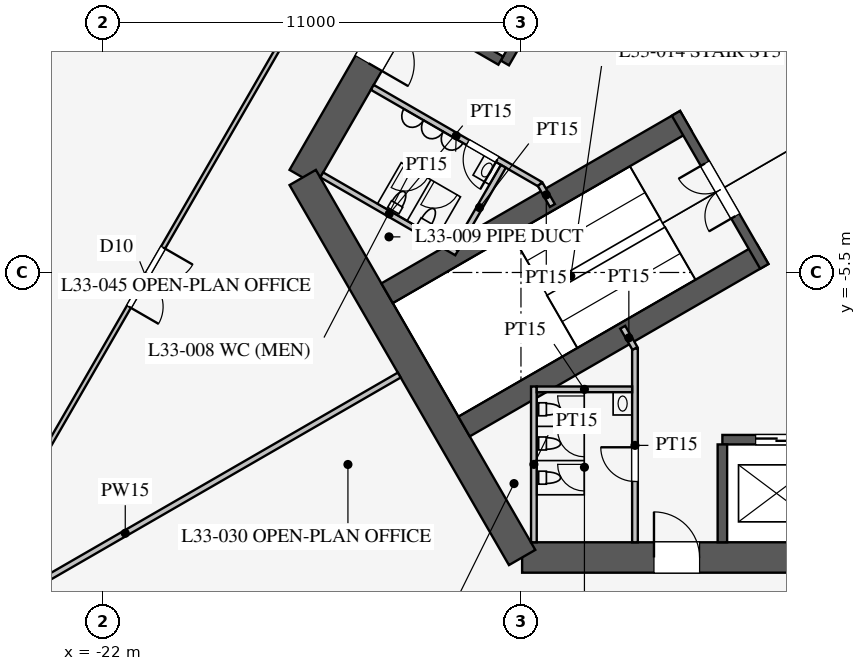
"""IFC4 building model, lengths in metres.
Left out: names, types, materials, properties, quantities, classifications, styles, units other than length and angle.
Written with IfcOpenShell. Run it as: python <this file> out.ifc"""

import sys

from ifc_helpers import new_model, si_unit, direction, frame, frame_2d, origin, place, context, subcontext, project, spatial, rectangle, extrude, element, fill, save


model = new_model("IFC4")
c1 = context("Model", 3, precision=1e-05, world=origin(), true_north=direction((0.0, 1.0)))
c2 = subcontext(c1, "Body", "Model", "MODEL_VIEW")
j1 = project(units=[si_unit("LENGTHUNIT", "METRE"), si_unit("PLANEANGLEUNIT", "RADIAN")], contexts=[c1])
p1 = place(None, origin())
s1 = spatial("IfcSite", under=j1, at=p1, CompositionType="ELEMENT")
p2 = place(p1, origin())
s2 = spatial("IfcBuilding", under=s1, at=p2, CompositionType="ELEMENT")
p3 = place(p2, frame((0.0, 0.0, 145.1)))
s3 = spatial("IfcBuildingStorey", under=s2, at=p3, CompositionType="ELEMENT", Elevation=145.1)
p4 = place(p3, frame((-10.97, -13.0, 0.0), z_axis=(0.0, 0.0, 1.0), x_axis=(1.0, 0.0, 0.0)))
e1 = element("IfcWall", 1, at=p4, inside=s3, PredefinedType="SHEAR", context=c2, shape_type="SweptSolid", body=[
    extrude(rectangle(XDim=21.939, YDim=0.8, at=frame_2d((10.97, 0.0))), origin(), (0.0, 0.0, 1.0), 4.2),
])
p5 = place(p4, frame((17.27, 0.0, 0.0)))
e2 = element("IfcOpeningElement", 2, at=p5, cuts=e1, PredefinedType="OPENING", context=c2, shape_type="SweptSolid", body=[
    extrude(rectangle(XDim=1.2, YDim=2.1, at=frame_2d((0.6, 1.05))), frame((0.0, 0.41, 0.0), z_axis=(0.0, -1.0, 0.0), x_axis=(1.0, 0.0, 0.0)), (0.0, 0.0, 1.0), 0.82),
])
p6 = place(p4, frame((3.47, 0.0, 0.0)))
e3 = element("IfcOpeningElement", 3, at=p6, cuts=e1, PredefinedType="OPENING", context=c2, shape_type="SweptSolid", body=[
    extrude(rectangle(XDim=1.2, YDim=2.1, at=frame_2d((0.6, 1.05))), frame((0.0, 0.41, 0.0), z_axis=(0.0, -1.0, 0.0), x_axis=(1.0, 0.0, 0.0)), (0.0, 0.0, 1.0), 0.82),
])
p7 = place(p3, frame((-5.773, 16.0, 0.0), z_axis=(0.0, 0.0, 1.0), x_axis=(-0.500002442456, -0.866023993627, 0.0)))
e4 = element("IfcWall", 4, at=p7, inside=s3, PredefinedType="SHEAR", context=c2, shape_type="SweptSolid", body=[
    extrude(rectangle(XDim=21.939, YDim=0.8, at=frame_2d((10.97, 0.0))), origin(), (0.0, 0.0, 1.0), 4.2),
])
p8 = place(p7, frame((17.27, 0.0, 0.0)))
e5 = element("IfcOpeningElement", 5, at=p8, cuts=e4, PredefinedType="OPENING", context=c2, shape_type="SweptSolid", body=[
    extrude(rectangle(XDim=1.2, YDim=2.1, at=frame_2d((0.6, 1.05))), frame((0.0, 0.41, 0.0), z_axis=(0.0, -1.0, 0.0), x_axis=(1.0, 0.0, 0.0)), (0.0, 0.0, 1.0), 0.82),
])
p9 = place(p7, frame((3.47, 0.0, 0.0)))
e6 = element("IfcOpeningElement", 6, at=p9, cuts=e4, PredefinedType="OPENING", context=c2, shape_type="SweptSolid", body=[
    extrude(rectangle(XDim=1.2, YDim=2.1, at=frame_2d((0.6, 1.05))), frame((0.0, 0.41, 0.0), z_axis=(0.0, -1.0, 0.0), x_axis=(1.0, 0.0, 0.0)), (0.0, 0.0, 1.0), 0.82),
])
p10 = place(p3, frame((-16.743, -3.0, 0.0), z_axis=(0.0, 0.0, 1.0), x_axis=(0.499995765644, -0.866027848477, 0.0)))
e7 = element("IfcWall", 7, at=p10, inside=s3, PredefinedType="SHEAR", context=c2, shape_type="SweptSolid", body=[
    extrude(rectangle(XDim=11.547, YDim=0.8, at=frame_2d((5.773, 0.0))), origin(), (0.0, 0.0, 1.0), 4.2),
])
p11 = place(p3, frame((-5.7, -9.9, 0.0), z_axis=(0.0, 0.0, 1.0), x_axis=(1.0, 0.0, 0.0)))
e8 = element("IfcWall", 8, at=p11, inside=s3, PredefinedType="SHEAR", context=c2, shape_type="SweptSolid", body=[
    extrude(rectangle(XDim=11.4, YDim=0.25, at=frame_2d((5.7, 0.0))), origin(), (0.0, 0.0, 1.0), 4.2),
])
p12 = place(p11, frame((0.875, 0.0, 0.0)))
e9 = element("IfcOpeningElement", 9, at=p12, cuts=e8, PredefinedType="OPENING", context=c2, shape_type="SweptSolid", body=[
    extrude(rectangle(XDim=1.1, YDim=2.2, at=frame_2d((0.55, 1.1))), frame((0.0, 0.135, 0.0), z_axis=(0.0, -1.0, 0.0), x_axis=(1.0, 0.0, 0.0)), (0.0, 0.0, 1.0), 0.27),
])
p13 = place(p11, frame((3.725, 0.0, 0.0)))
e10 = element("IfcOpeningElement", 10, at=p13, cuts=e8, PredefinedType="OPENING", context=c2, shape_type="SweptSolid", body=[
    extrude(rectangle(XDim=1.1, YDim=2.2, at=frame_2d((0.55, 1.1))), frame((0.0, 0.135, 0.0), z_axis=(0.0, -1.0, 0.0), x_axis=(1.0, 0.0, 0.0)), (0.0, 0.0, 1.0), 0.27),
])
p14 = place(p11, frame((6.575, 0.0, 0.0)))
e11 = element("IfcOpeningElement", 11, at=p14, cuts=e8, PredefinedType="OPENING", context=c2, shape_type="SweptSolid", body=[
    extrude(rectangle(XDim=1.1, YDim=2.2, at=frame_2d((0.55, 1.1))), frame((0.0, 0.135, 0.0), z_axis=(0.0, -1.0, 0.0), x_axis=(1.0, 0.0, 0.0)), (0.0, 0.0, 1.0), 0.27),
])
p15 = place(p11, frame((9.425, 0.0, 0.0)))
e12 = element("IfcOpeningElement", 12, at=p15, cuts=e8, PredefinedType="OPENING", context=c2, shape_type="SweptSolid", body=[
    extrude(rectangle(XDim=1.1, YDim=2.2, at=frame_2d((0.55, 1.1))), frame((0.0, 0.135, 0.0), z_axis=(0.0, -1.0, 0.0), x_axis=(1.0, 0.0, 0.0)), (0.0, 0.0, 1.0), 0.27),
])
p16 = place(p3, frame((-5.7, -10.025, 0.0), z_axis=(0.0, 0.0, 1.0), x_axis=(0.0, -1.0, 0.0)))
e13 = element("IfcWall", 13, at=p16, inside=s3, PredefinedType="SHEAR", context=c2, shape_type="SweptSolid", body=[
    extrude(rectangle(XDim=2.575, YDim=0.25, at=frame_2d((1.288, 0.0))), origin(), (0.0, 0.0, 1.0), 4.2),
])
p17 = place(p3, frame((-5.724, 9.886, 0.0), z_axis=(0.0, 0.0, 1.0), x_axis=(-0.500001763848, -0.866024385424, 0.0)))
e14 = element("IfcWall", 14, at=p17, inside=s3, PredefinedType="SHEAR", context=c2, shape_type="SweptSolid", body=[
    extrude(rectangle(XDim=11.4, YDim=0.25, at=frame_2d((5.7, 0.0))), origin(), (0.0, 0.0, 1.0), 4.2),
])
p18 = place(p17, frame((6.525, 0.0, 0.0)))
e15 = element("IfcOpeningElement", 15, at=p18, cuts=e14, PredefinedType="OPENING", context=c2, shape_type="SweptSolid", body=[
    extrude(rectangle(XDim=1.2, YDim=2.2, at=frame_2d((0.6, 1.1))), frame((0.0, 0.135, 0.0), z_axis=(0.0, -1.0, 0.0), x_axis=(1.0, 0.0, 0.0)), (0.0, 0.0, 1.0), 0.27),
])
p19 = place(p17, frame((9.375, 0.0, 0.0)))
e16 = element("IfcOpeningElement", 16, at=p19, cuts=e14, PredefinedType="OPENING", context=c2, shape_type="SweptSolid", body=[
    extrude(rectangle(XDim=1.2, YDim=2.2, at=frame_2d((0.6, 1.1))), frame((0.0, 0.135, 0.0), z_axis=(0.0, -1.0, 0.0), x_axis=(1.0, 0.0, 0.0)), (0.0, 0.0, 1.0), 0.27),
])
p20 = place(p3, frame((-11.532, 0.076, 0.0), z_axis=(0.0, 0.0, 1.0), x_axis=(-0.866005588531, 0.500034319456, 0.0)))
e17 = element("IfcWall", 17, at=p20, inside=s3, PredefinedType="SHEAR", context=c2, shape_type="SweptSolid", body=[
    extrude(rectangle(XDim=2.575, YDim=0.25, at=frame_2d((1.288, 0.0))), origin(), (0.0, 0.0, 1.0), 4.2),
])
for number, where, z_axis, x_axis in (
    (18, (-6.663, -1.509, 0.0), (0.0, 0.0, 1.0), (-0.866, -0.5, 0.0)),
    (19, (-4.638, -5.016, 0.0), (0.0, 0.0, 1.0), (-0.866, -0.5, 0.0)),
):
    element("IfcWall", number, at=place(p3, frame(where, z_axis=z_axis, x_axis=x_axis)), inside=s3, PredefinedType="SHEAR", context=c2, shape_type="SweptSolid", body=[
        extrude(rectangle(XDim=9.075, YDim=0.6, at=frame_2d((4.538, 0.0))), origin(), (0.0, 0.0, 1.0), 4.2),
    ])
p21 = place(p3, frame((-6.922, -1.312, 0.0), z_axis=(0.0, 0.0, 1.0), x_axis=(0.499984536904, -0.866034331223, 0.0)))
e20 = element("IfcWall", 20, at=p21, inside=s3, PredefinedType="SHEAR", context=c2, shape_type="SweptSolid", body=[
    extrude(rectangle(XDim=4.65, YDim=0.25, at=frame_2d((2.325, 0.0))), origin(), (0.0, 0.0, 1.0), 4.2),
])
p22 = place(p21, frame((1.525, 0.0, 0.0)))
e21 = element("IfcOpeningElement", 21, at=p22, cuts=e20, PredefinedType="OPENING", context=c2, shape_type="SweptSolid", body=[
    extrude(rectangle(XDim=1.6, YDim=2.1, at=frame_2d((0.8, 1.05))), frame((0.0, 0.135, 0.0), z_axis=(0.0, -1.0, 0.0), x_axis=(1.0, 0.0, 0.0)), (0.0, 0.0, 1.0), 0.27),
])
p23 = place(p3, frame((-8.0, -7.5, 0.0), z_axis=(0.0, 0.0, 1.0), x_axis=(0.0, -1.0, 0.0)))
e22 = element("IfcWall", 22, at=p23, inside=s3, PredefinedType="PARTITIONING", context=c2, shape_type="SweptSolid", body=[
    extrude(rectangle(XDim=5.1, YDim=0.15, at=frame_2d((2.55, 0.0))), origin(), (0.0, 0.0, 1.0), 4.0),
])
p24 = place(p23, frame((2.6, 0.0, 0.0)))
e23 = element("IfcOpeningElement", 23, at=p24, cuts=e22, PredefinedType="OPENING", context=c2, shape_type="SweptSolid", body=[
    extrude(rectangle(XDim=0.9, YDim=2.1, at=frame_2d((0.45, 1.05))), frame((0.0, 0.085, 0.0), z_axis=(0.0, -1.0, 0.0), x_axis=(1.0, 0.0, 0.0)), (0.0, 0.0, 1.0), 0.17),
])
p25 = place(p3, frame((-10.495, -3.178, 0.0), z_axis=(0.0, 0.0, 1.0), x_axis=(-0.86602216432, 0.500005610874, 0.0)))
e24 = element("IfcWall", 24, at=p25, inside=s3, PredefinedType="PARTITIONING", context=c2, shape_type="SweptSolid", body=[
    extrude(rectangle(XDim=5.1, YDim=0.15, at=frame_2d((2.55, 0.0))), origin(), (0.0, 0.0, 1.0), 4.0),
])
p26 = place(p25, frame((1.3, 0.0, 0.0)))
e25 = element("IfcOpeningElement", 25, at=p26, cuts=e24, PredefinedType="OPENING", context=c2, shape_type="SweptSolid", body=[
    extrude(rectangle(XDim=0.9, YDim=2.1, at=frame_2d((0.45, 1.05))), frame((0.0, 0.085, 0.0), z_axis=(0.0, -1.0, 0.0), x_axis=(1.0, 0.0, 0.0)), (0.0, 0.0, 1.0), 0.17),
])
for number, where, z_axis, x_axis in (
    (26, (-10.495, -3.178, 0.0), (0.0, 0.0, 1.0), (0.5, -0.866, 0.0)),
    (27, (-8.0, -7.5, 0.0), (0.0, 0.0, 1.0), (-0.5, 0.866, 0.0)),
):
    element("IfcWall", number, at=place(p3, frame(where, z_axis=z_axis, x_axis=x_axis)), inside=s3, PredefinedType="PARTITIONING", context=c2, shape_type="SweptSolid", body=[
        extrude(rectangle(XDim=0.645, YDim=0.15, at=frame_2d((0.323, 0.0))), origin(), (0.0, 0.0, 1.0), 4.0),
    ])
p27 = place(p3, frame((-12.691, -4.982, 0.0), z_axis=(0.0, 0.0, 1.0), x_axis=(-0.8660249478, 0.500000789788, 0.0)))
e28 = element("IfcWall", 28, at=p27, inside=s3, PredefinedType="PARTITIONING", context=c2, shape_type="SweptSolid", body=[
    extrude(rectangle(XDim=4.1, YDim=0.15, at=frame_2d((2.05, 0.0))), origin(), (0.0, 0.0, 1.0), 4.0),
])
p28 = place(p3, frame((-11.464, -2.706, 0.0), z_axis=(0.0, 0.0, 1.0), x_axis=(-0.50001992892, -0.866013897511, 0.0)))
e29 = element("IfcWall", 29, at=p28, inside=s3, PredefinedType="PARTITIONING", context=c2, shape_type="SweptSolid", body=[
    extrude(rectangle(XDim=2.51, YDim=0.15, at=frame_2d((1.255, 0.0))), origin(), (0.0, 0.0, 1.0), 4.0),
])
p29 = place(p3, frame((-10.66, -8.5, 0.0), z_axis=(0.0, 0.0, 1.0), x_axis=(0.0, -1.0, 0.0)))
e30 = element("IfcWall", 30, at=p29, inside=s3, PredefinedType="PARTITIONING", context=c2, shape_type="SweptSolid", body=[
    extrude(rectangle(XDim=4.1, YDim=0.15, at=frame_2d((2.05, 0.0))), origin(), (0.0, 0.0, 1.0), 4.0),
])
p30 = place(p3, frame((-8.075, -8.575, 0.0), z_axis=(0.0, 0.0, 1.0), x_axis=(-1.0, 0.0, 0.0)))
e31 = element("IfcWall", 31, at=p30, inside=s3, PredefinedType="PARTITIONING", context=c2, shape_type="SweptSolid", body=[
    extrude(rectangle(XDim=2.51, YDim=0.15, at=frame_2d((1.255, 0.0))), origin(), (0.0, 0.0, 1.0), 4.0),
])
p31 = place(p3, frame((-14.203, -8.2, 0.0), z_axis=(0.0, 0.0, 1.0), x_axis=(-0.866024668836, -0.500001272966, 0.0)))
e32 = element("IfcWall", 32, at=p31, inside=s3, PredefinedType="PARTITIONING", context=c2, shape_type="SweptSolid", body=[
    extrude(rectangle(XDim=16.65, YDim=0.15, at=frame_2d((8.325, 0.0))), origin(), (0.0, 0.0, 1.0), 2.3),
])
p32 = place(p3, frame((-0.016, 30.491, 0.0), z_axis=(0.0, 0.0, 1.0), x_axis=(-0.50000091641, -0.866024874695, 0.0)))
e33 = element("IfcWall", 33, at=p32, inside=s3, PredefinedType="PARTITIONING", context=c2, shape_type="SweptSolid", body=[
    extrude(rectangle(XDim=52.796, YDim=0.12, at=frame_2d((26.398, 0.0))), origin(), (0.0, 0.0, 1.0), 2.9),
])
p33 = place(p32, frame((10.2, 0.0, 0.15)))
e34 = element("IfcOpeningElement", 34, at=p33, cuts=e33, PredefinedType="OPENING", context=c2, shape_type="SweptSolid", body=[
    extrude(rectangle(XDim=1.8, YDim=2.1, at=frame_2d((0.9, 1.05))), frame((0.0, 0.07, 0.0), z_axis=(0.0, -1.0, 0.0), x_axis=(1.0, 0.0, 0.0)), (0.0, 0.0, 1.0), 0.14),
])
p34 = place(p32, frame((40.8, 0.0, 0.15)))
e35 = element("IfcOpeningElement", 35, at=p34, cuts=e33, PredefinedType="OPENING", context=c2, shape_type="SweptSolid", body=[
    extrude(rectangle(XDim=1.8, YDim=2.1, at=frame_2d((0.9, 1.05))), frame((0.0, 0.07, 0.0), z_axis=(0.0, -1.0, 0.0), x_axis=(1.0, 0.0, 0.0)), (0.0, 0.0, 1.0), 0.14),
])
p35 = place(p24, frame((0.9, 0.0, 0.0), z_axis=(0.0, 0.0, 1.0), x_axis=(-1.0, 0.0, 0.0)))
e36 = element("IfcDoor", 36, at=p35, inside=s3, OperationType="SINGLE_SWING_RIGHT", PredefinedType="DOOR", context=c2, shape_type="SweptSolid", body=[
    extrude(rectangle(XDim=0.9, YDim=2.1, at=frame_2d((0.45, 1.05))), frame((0.0, 0.025, 0.0), z_axis=(0.0, -1.0, 0.0), x_axis=(1.0, 0.0, 0.0)), (0.0, 0.0, 1.0), 0.05),
])
fill(e23, e36)
p36 = place(p26, origin())
e37 = element("IfcDoor", 37, at=p36, inside=s3, OperationType="SINGLE_SWING_LEFT", PredefinedType="DOOR", context=c2, shape_type="SweptSolid", body=[
    extrude(rectangle(XDim=0.9, YDim=2.1, at=frame_2d((0.45, 1.05))), frame((0.0, 0.025, 0.0), z_axis=(0.0, -1.0, 0.0), x_axis=(1.0, 0.0, 0.0)), (0.0, 0.0, 1.0), 0.05),
])
fill(e25, e37)
p37 = place(p22, frame((1.6, 0.0, 0.0), z_axis=(0.0, 0.0, 1.0), x_axis=(-1.0, 0.0, 0.0)))
e38 = element("IfcDoor", 38, at=p37, inside=s3, OperationType="DOUBLE_DOOR_SINGLE_SWING", PredefinedType="DOOR", context=c2, shape_type="SweptSolid", body=[
    extrude(rectangle(XDim=1.6, YDim=2.1, at=frame_2d((0.8, 1.05))), frame((0.0, 0.025, 0.0), z_axis=(0.0, -1.0, 0.0), x_axis=(1.0, 0.0, 0.0)), (0.0, 0.0, 1.0), 0.05),
])
fill(e21, e38)
p38 = place(p6, origin())
e39 = element("IfcDoor", 39, at=p38, inside=s3, OperationType="SINGLE_SWING_LEFT", PredefinedType="DOOR", context=c2, shape_type="SweptSolid", body=[
    extrude(rectangle(XDim=1.2, YDim=2.1, at=frame_2d((0.6, 1.05))), frame((0.0, 0.025, 0.0), z_axis=(0.0, -1.0, 0.0), x_axis=(1.0, 0.0, 0.0)), (0.0, 0.0, 1.0), 0.05),
])
fill(e3, e39)
p39 = place(p8, origin())
e40 = element("IfcDoor", 40, at=p39, inside=s3, OperationType="SINGLE_SWING_RIGHT", PredefinedType="DOOR", context=c2, shape_type="SweptSolid", body=[
    extrude(rectangle(XDim=1.2, YDim=2.1, at=frame_2d((0.6, 1.05))), frame((0.0, 0.025, 0.0), z_axis=(0.0, -1.0, 0.0), x_axis=(1.0, 0.0, 0.0)), (0.0, 0.0, 1.0), 0.05),
])
fill(e5, e40)
p40 = place(p34, origin())
e41 = element("IfcDoor", 41, at=p40, inside=s3, OperationType="DOUBLE_DOOR_SINGLE_SWING", PredefinedType="DOOR", context=c2, shape_type="SweptSolid", body=[
    extrude(rectangle(XDim=1.8, YDim=2.1, at=frame_2d((0.9, 1.05))), frame((0.0, 0.025, 0.0), z_axis=(0.0, -1.0, 0.0), x_axis=(1.0, 0.0, 0.0)), (0.0, 0.0, 1.0), 0.05),
])
fill(e35, e41)
p41 = place(p12, origin())
e42 = element("IfcDoor", 42, at=p41, inside=s3, OperationType="DOUBLE_DOOR_SLIDING", PredefinedType="DOOR", context=c2, shape_type="SweptSolid", body=[
    extrude(rectangle(XDim=1.1, YDim=2.2, at=frame_2d((0.55, 1.1))), frame((0.0, 0.025, 0.0), z_axis=(0.0, -1.0, 0.0), x_axis=(1.0, 0.0, 0.0)), (0.0, 0.0, 1.0), 0.05),
])
fill(e9, e42)
save(model, sys.argv[1])
